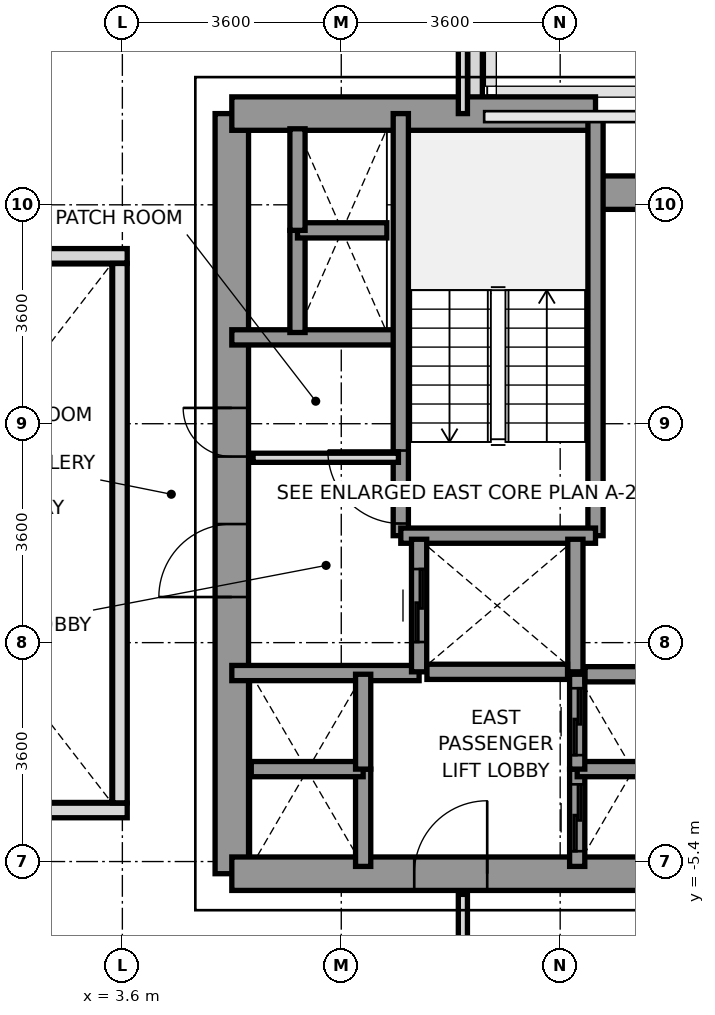
"""IFC4 building model, lengths in metres.
Left out: names, types, materials, properties, quantities, classifications, styles, units other than length and angle.
Written with IfcOpenShell. Run it as: python <this file> out.ifc"""

import sys

from ifc_helpers import new_model, si_unit, direction, frame, frame_2d, origin, place, context, subcontext, project, spatial, rectangle, extrude, source, transform, mapped, element, fill, save


model = new_model("IFC4")
c1 = context("Model", 3, precision=1e-05, world=origin(), true_north=direction((0.0, 1.0)))
c2 = subcontext(c1, "Body", "Model", "MODEL_VIEW")
j1 = project(units=[si_unit("LENGTHUNIT", "METRE"), si_unit("PLANEANGLEUNIT", "RADIAN")], contexts=[c1])
p1 = place(None, origin())
s1 = spatial("IfcSite", under=j1, at=p1, CompositionType="ELEMENT")
p2 = place(p1, origin())
s2 = spatial("IfcBuilding", under=s1, at=p2, CompositionType="ELEMENT")
p3 = place(p2, frame((0.0, 0.0, 71.4)))
s3 = spatial("IfcBuildingStorey", under=s2, at=p3, CompositionType="ELEMENT", Elevation=71.4)
p4 = place(p3, frame((9.4, 8.397, 0.0), z_axis=(0.0, 0.0, 1.0), x_axis=(0.0, -1.0, 0.0)))
e1 = element("IfcWall", 1, at=p4, inside=s3, PredefinedType="PARAPET", context=c2, shape_type="SweptSolid", body=[
    extrude(rectangle(XDim=1.444, YDim=0.24, at=frame_2d((0.722, 0.0))), origin(), (0.0, 0.0, 1.0), 1.15),
])
p5 = place(p3, frame((5.4, -5.6, 0.0), z_axis=(0.0, 0.0, 1.0), x_axis=(0.0, 1.0, 0.0)))
e2 = element("IfcWall", 2, at=p5, inside=s3, PredefinedType="SHEAR", context=c2, shape_type="SweptSolid", body=[
    extrude(rectangle(XDim=12.5, YDim=0.55, at=frame_2d((6.25, 0.0))), origin(), (0.0, 0.0, 1.0), 3.2),
])
p6 = place(p5, frame((4.55, 0.0, 0.0)))
e3 = element("IfcOpeningElement", 3, at=p6, cuts=e2, PredefinedType="OPENING", context=c2, shape_type="SweptSolid", body=[
    extrude(rectangle(XDim=1.2, YDim=2.2, at=frame_2d((0.6, 1.1))), frame((0.0, 0.285, 0.0), z_axis=(0.0, -1.0, 0.0), x_axis=(1.0, 0.0, 0.0)), (0.0, 0.0, 1.0), 0.57),
])
p7 = place(p5, frame((6.86, 0.0, 0.0)))
e4 = element("IfcOpeningElement", 4, at=p7, cuts=e2, PredefinedType="OPENING", context=c2, shape_type="SweptSolid", body=[
    extrude(rectangle(XDim=0.8, YDim=2.1, at=frame_2d((0.4, 1.05))), frame((0.0, 0.285, 0.0), z_axis=(0.0, -1.0, 0.0), x_axis=(1.0, 0.0, 0.0)), (0.0, 0.0, 1.0), 0.57),
])
p8 = place(p3, frame((5.4, 6.9, 0.0), z_axis=(0.0, 0.0, 1.0), x_axis=(1.0, 0.0, 0.0)))
e5 = element("IfcWall", 5, at=p8, inside=s3, PredefinedType="SHEAR", context=c2, shape_type="SweptSolid", body=[
    extrude(rectangle(XDim=5.981, YDim=0.55, at=frame_2d((2.991, 0.0))), origin(), (0.0, 0.0, 1.0), 3.2),
])
p9 = place(p3, frame((11.381, 5.6, 0.0), z_axis=(0.0, 0.0, 1.0), x_axis=(1.0, 0.0, 0.0)))
e6 = element("IfcWall", 6, at=p9, inside=s3, PredefinedType="SHEAR", context=c2, shape_type="SweptSolid", body=[
    extrude(rectangle(XDim=1.819, YDim=0.55, at=frame_2d((0.909, 0.0))), origin(), (0.0, 0.0, 1.0), 3.2),
])
p10 = place(p3, frame((5.4, -5.6, 0.0), z_axis=(0.0, 0.0, 1.0), x_axis=(1.0, 0.0, 0.0)))
e7 = element("IfcWall", 7, at=p10, inside=s3, PredefinedType="SHEAR", context=c2, shape_type="SweptSolid", body=[
    extrude(rectangle(XDim=7.8, YDim=0.55, at=frame_2d((3.9, 0.0))), origin(), (0.0, 0.0, 1.0), 3.2),
])
p11 = place(p10, frame((3.0, 0.0, 0.0)))
e8 = element("IfcOpeningElement", 8, at=p11, cuts=e7, PredefinedType="OPENING", context=c2, shape_type="SweptSolid", body=[
    extrude(rectangle(XDim=1.2, YDim=2.2, at=frame_2d((0.6, 1.1))), frame((0.0, 0.285, 0.0), z_axis=(0.0, -1.0, 0.0), x_axis=(1.0, 0.0, 0.0)), (0.0, 0.0, 1.0), 0.57),
])
p12 = place(p3, frame((5.4, 3.22, 0.0), z_axis=(0.0, 0.0, 1.0), x_axis=(1.0, 0.0, 0.0)))
e9 = element("IfcWall", 9, at=p12, inside=s3, PredefinedType="SOLIDWALL", context=c2, shape_type="SweptSolid", body=[
    extrude(rectangle(XDim=2.78, YDim=0.25, at=frame_2d((1.39, 0.0))), origin(), (0.0, 0.0, 1.0), 3.2),
])
p13 = place(p3, frame((5.4, -2.3, 0.0), z_axis=(0.0, 0.0, 1.0), x_axis=(1.0, 0.0, 0.0)))
e10 = element("IfcWall", 10, at=p13, inside=s3, PredefinedType="SOLIDWALL", context=c2, shape_type="SweptSolid", body=[
    extrude(rectangle(XDim=3.08, YDim=0.25, at=frame_2d((1.54, 0.0))), origin(), (0.0, 0.0, 1.0), 3.2),
])
p14 = place(p3, frame((8.179, -0.041, 0.0), z_axis=(0.0, 0.0, 1.0), x_axis=(0.0, 1.0, 0.0)))
e11 = element("IfcWall", 11, at=p14, inside=s3, PredefinedType="SOLIDWALL", context=c2, shape_type="SweptSolid", body=[
    extrude(rectangle(XDim=6.941, YDim=0.25, at=frame_2d((3.47, 0.0))), origin(), (0.0, 0.0, 1.0), 3.2),
])
p15 = place(p14, frame((0.2, 0.0, 0.0)))
e12 = element("IfcOpeningElement", 12, at=p15, cuts=e11, PredefinedType="OPENING", context=c2, shape_type="SweptSolid", body=[
    extrude(rectangle(XDim=1.2, YDim=2.2, at=frame_2d((0.6, 1.1))), frame((0.0, 0.135, 0.0), z_axis=(0.0, -1.0, 0.0), x_axis=(1.0, 0.0, 0.0)), (0.0, 0.0, 1.0), 0.27),
])
p16 = place(p3, frame((11.381, -0.041, 0.0), z_axis=(0.0, 0.0, 1.0), x_axis=(0.0, 1.0, 0.0)))
e13 = element("IfcWall", 13, at=p16, inside=s3, PredefinedType="SOLIDWALL", context=c2, shape_type="SweptSolid", body=[
    extrude(rectangle(XDim=6.941, YDim=0.25, at=frame_2d((3.47, 0.0))), origin(), (0.0, 0.0, 1.0), 3.2),
])
p17 = place(p3, frame((8.179, -0.041, 0.0), z_axis=(0.0, 0.0, 1.0), x_axis=(1.0, 0.0, 0.0)))
e14 = element("IfcWall", 14, at=p17, inside=s3, PredefinedType="SOLIDWALL", context=c2, shape_type="SweptSolid", body=[
    extrude(rectangle(XDim=3.202, YDim=0.25, at=frame_2d((1.601, 0.0))), origin(), (0.0, 0.0, 1.0), 3.2),
])
p18 = place(p3, frame((8.48, -2.28, 0.0), z_axis=(0.0, 0.0, 1.0), x_axis=(0.0, 1.0, 0.0)))
e15 = element("IfcWall", 15, at=p18, inside=s3, PredefinedType="SOLIDWALL", context=c2, shape_type="SweptSolid", body=[
    extrude(rectangle(XDim=2.18, YDim=0.25, at=frame_2d((1.09, 0.0))), origin(), (0.0, 0.0, 1.0), 3.2),
])
p19 = place(p18, frame((0.49, 0.0, 0.0)))
e16 = element("IfcOpeningElement", 16, at=p19, cuts=e15, PredefinedType="OPENING", context=c2, shape_type="SweptSolid", body=[
    extrude(rectangle(XDim=1.2, YDim=2.2, at=frame_2d((0.6, 1.1))), frame((0.0, 0.135, 0.0), z_axis=(0.0, -1.0, 0.0), x_axis=(1.0, 0.0, 0.0)), (0.0, 0.0, 1.0), 0.27),
])
p20 = place(p3, frame((11.05, -2.28, 0.0), z_axis=(0.0, 0.0, 1.0), x_axis=(0.0, 1.0, 0.0)))
e17 = element("IfcWall", 17, at=p20, inside=s3, PredefinedType="SOLIDWALL", context=c2, shape_type="SweptSolid", body=[
    extrude(rectangle(XDim=2.18, YDim=0.25, at=frame_2d((1.09, 0.0))), origin(), (0.0, 0.0, 1.0), 3.2),
])
p21 = place(p3, frame((8.609, -2.28, 0.0), z_axis=(0.0, 0.0, 1.0), x_axis=(1.0, 0.0, 0.0)))
e18 = element("IfcWall", 18, at=p21, inside=s3, PredefinedType="SOLIDWALL", context=c2, shape_type="SweptSolid", body=[
    extrude(rectangle(XDim=2.312, YDim=0.25, at=frame_2d((1.156, 0.0))), origin(), (0.0, 0.0, 1.0), 3.2),
])
p22 = place(p3, frame((11.08, -5.48, 0.0), z_axis=(0.0, 0.0, 1.0), x_axis=(0.0, 1.0, 0.0)))
e19 = element("IfcWall", 19, at=p22, inside=s3, PredefinedType="SOLIDWALL", context=c2, shape_type="SweptSolid", body=[
    extrude(rectangle(XDim=1.6, YDim=0.25, at=frame_2d((0.8, 0.0))), origin(), (0.0, 0.0, 1.0), 3.2),
])
p23 = place(p22, frame((0.25, 0.0, 0.0)))
e20 = element("IfcOpeningElement", 20, at=p23, cuts=e19, PredefinedType="OPENING", context=c2, shape_type="SweptSolid", body=[
    extrude(rectangle(XDim=1.1, YDim=2.2, at=frame_2d((0.55, 1.1))), frame((0.0, 0.135, 0.0), z_axis=(0.0, -1.0, 0.0), x_axis=(1.0, 0.0, 0.0)), (0.0, 0.0, 1.0), 0.27),
])
p24 = place(p3, frame((11.08, -3.88, 0.0), z_axis=(0.0, 0.0, 1.0), x_axis=(1.0, 0.0, 0.0)))
e21 = element("IfcWall", 21, at=p24, inside=s3, PredefinedType="SOLIDWALL", context=c2, shape_type="SweptSolid", body=[
    extrude(rectangle(XDim=1.84, YDim=0.25, at=frame_2d((0.92, 0.0))), origin(), (0.0, 0.0, 1.0), 3.2),
])
p25 = place(p3, frame((11.08, -3.88, 0.0), z_axis=(0.0, 0.0, 1.0), x_axis=(0.0, 1.0, 0.0)))
e22 = element("IfcWall", 22, at=p25, inside=s3, PredefinedType="SOLIDWALL", context=c2, shape_type="SweptSolid", body=[
    extrude(rectangle(XDim=1.56, YDim=0.25, at=frame_2d((0.78, 0.0))), origin(), (0.0, 0.0, 1.0), 3.2),
])
p26 = place(p25, frame((0.23, 0.0, 0.0)))
e23 = element("IfcOpeningElement", 23, at=p26, cuts=e22, PredefinedType="OPENING", context=c2, shape_type="SweptSolid", body=[
    extrude(rectangle(XDim=1.1, YDim=2.2, at=frame_2d((0.55, 1.1))), frame((0.0, 0.135, 0.0), z_axis=(0.0, -1.0, 0.0), x_axis=(1.0, 0.0, 0.0)), (0.0, 0.0, 1.0), 0.27),
])
p27 = place(p3, frame((11.209, -2.32, 0.0), z_axis=(0.0, 0.0, 1.0), x_axis=(1.0, 0.0, 0.0)))
e24 = element("IfcWall", 24, at=p27, inside=s3, PredefinedType="SOLIDWALL", context=c2, shape_type="SweptSolid", body=[
    extrude(rectangle(XDim=1.582, YDim=0.25, at=frame_2d((0.791, 0.0))), origin(), (0.0, 0.0, 1.0), 3.2),
])
p28 = place(p3, frame((7.56, -5.48, 0.0), z_axis=(0.0, 0.0, 1.0), x_axis=(0.0, 1.0, 0.0)))
e25 = element("IfcWall", 25, at=p28, inside=s3, PredefinedType="SOLIDWALL", context=c2, shape_type="SweptSolid", body=[
    extrude(rectangle(XDim=1.6, YDim=0.25, at=frame_2d((0.8, 0.0))), origin(), (0.0, 0.0, 1.0), 3.2),
])
p29 = place(p3, frame((5.72, -3.88, 0.0), z_axis=(0.0, 0.0, 1.0), x_axis=(1.0, 0.0, 0.0)))
e26 = element("IfcWall", 26, at=p29, inside=s3, PredefinedType="SOLIDWALL", context=c2, shape_type="SweptSolid", body=[
    extrude(rectangle(XDim=1.84, YDim=0.25, at=frame_2d((0.92, 0.0))), origin(), (0.0, 0.0, 1.0), 3.2),
])
p30 = place(p3, frame((7.56, -3.88, 0.0), z_axis=(0.0, 0.0, 1.0), x_axis=(0.0, 1.0, 0.0)))
e27 = element("IfcWall", 27, at=p30, inside=s3, PredefinedType="SOLIDWALL", context=c2, shape_type="SweptSolid", body=[
    extrude(rectangle(XDim=1.56, YDim=0.25, at=frame_2d((0.78, 0.0))), origin(), (0.0, 0.0, 1.0), 3.2),
])
p31 = place(p3, frame((6.48, 3.3, 0.0), z_axis=(0.0, 0.0, 1.0), x_axis=(0.0, 1.0, 0.0)))
e28 = element("IfcWall", 28, at=p31, inside=s3, PredefinedType="SOLIDWALL", context=c2, shape_type="SweptSolid", body=[
    extrude(rectangle(XDim=1.68, YDim=0.25, at=frame_2d((0.84, 0.0))), origin(), (0.0, 0.0, 1.0), 3.2),
])
p32 = place(p3, frame((6.48, 4.98, 0.0), z_axis=(0.0, 0.0, 1.0), x_axis=(1.0, 0.0, 0.0)))
e29 = element("IfcWall", 29, at=p32, inside=s3, PredefinedType="SOLIDWALL", context=c2, shape_type="SweptSolid", body=[
    extrude(rectangle(XDim=1.47, YDim=0.25, at=frame_2d((0.735, 0.0))), origin(), (0.0, 0.0, 1.0), 3.2),
])
p33 = place(p3, frame((6.48, 4.98, 0.0), z_axis=(0.0, 0.0, 1.0), x_axis=(0.0, 1.0, 0.0)))
e30 = element("IfcWall", 30, at=p33, inside=s3, PredefinedType="SOLIDWALL", context=c2, shape_type="SweptSolid", body=[
    extrude(rectangle(XDim=1.67, YDim=0.25, at=frame_2d((0.835, 0.0))), origin(), (0.0, 0.0, 1.0), 3.2),
])
p34 = place(p3, frame((5.75, 1.24, 0.0), z_axis=(0.0, 0.0, 1.0), x_axis=(1.0, 0.0, 0.0)))
e31 = element("IfcWall", 31, at=p34, inside=s3, PredefinedType="PARTITIONING", context=c2, shape_type="SweptSolid", body=[
    extrude(rectangle(XDim=2.39, YDim=0.15, at=frame_2d((1.195, 0.0))), origin(), (0.0, 0.0, 1.0), 2.3),
])
p35 = place(p3, frame((9.2, 6.9, 0.0), z_axis=(0.0, 0.0, 1.0), x_axis=(0.0, 1.0, 0.0)))
e32 = element("IfcWall", 32, at=p35, inside=s3, PredefinedType="PARTITIONING", context=c2, shape_type="SweptSolid", body=[
    extrude(rectangle(XDim=8.78, YDim=0.15, at=frame_2d((4.39, 0.0))), origin(), (0.0, 0.0, 1.0), 2.65),
])
p36 = place(p3, frame((9.2, -15.68, 0.0), z_axis=(0.0, 0.0, 1.0), x_axis=(0.0, 1.0, 0.0)))
e33 = element("IfcWall", 33, at=p36, inside=s3, PredefinedType="PARTITIONING", context=c2, shape_type="SweptSolid", body=[
    extrude(rectangle(XDim=9.74, YDim=0.15, at=frame_2d((4.87, 0.0))), origin(), (0.0, 0.0, 1.0), 2.65),
])
for number, where, z_axis, x_axis in (
    (34, (-3.68, -4.56, 0.0), (0.0, 0.0, 1.0), (1.0, 0.0, 0.0)),
    (35, (-3.68, 4.56, 0.0), (0.0, 0.0, 1.0), (1.0, 0.0, 0.0)),
):
    element("IfcWall", number, at=place(p3, frame(where, z_axis=z_axis, x_axis=x_axis)), inside=s3, PredefinedType="PARAPET", context=c2, shape_type="SweptSolid", body=[
        extrude(rectangle(XDim=7.36, YDim=0.24, at=frame_2d((3.68, 0.0))), origin(), (0.0, 0.0, 1.0), 1.15),
    ])
p37 = place(p3, frame((3.56, -4.435, 0.0), z_axis=(0.0, 0.0, 1.0), x_axis=(0.0, 1.0, 0.0)))
e36 = element("IfcWall", 36, at=p37, inside=s3, PredefinedType="PARAPET", context=c2, shape_type="SweptSolid", body=[
    extrude(rectangle(XDim=8.87, YDim=0.24, at=frame_2d((4.435, 0.0))), origin(), (0.0, 0.0, 1.0), 1.15),
])
m1 = source(origin(), c2, "Body", "SweptSolid", [
    extrude(rectangle(XDim=1.2, YDim=2.2, at=frame_2d((0.6, 1.1))), frame((0.0, 0.025, 0.0), z_axis=(0.0, -1.0, 0.0), x_axis=(1.0, 0.0, 0.0)), (0.0, 0.0, 1.0), 0.05),
])
p38 = place(p15, origin())
e37 = element("IfcDoor", 37, at=p38, inside=s3, OperationType="SINGLE_SWING_RIGHT", PredefinedType="DOOR", context=c2, shape_type="MappedRepresentation", body=[
    mapped(m1, transform((0.0, 0.0, 0.0), x_axis=(1.0, 0.0, 0.0), y_axis=(0.0, 1.0, 0.0), z_axis=(0.0, 0.0, 1.0), scale=1.0)),
])
fill(e12, e37)
p39 = place(p6, origin())
e38 = element("IfcDoor", 38, at=p39, inside=s3, OperationType="SINGLE_SWING_LEFT", PredefinedType="DOOR", context=c2, shape_type="MappedRepresentation", body=[
    mapped(m1, transform((0.0, 0.0, 0.0), x_axis=(1.0, 0.0, 0.0), y_axis=(0.0, 1.0, 0.0), z_axis=(0.0, 0.0, 1.0), scale=1.0)),
])
fill(e3, e38)
p40 = place(p11, origin())
e39 = element("IfcDoor", 39, at=p40, inside=s3, OperationType="SINGLE_SWING_RIGHT", PredefinedType="DOOR", context=c2, shape_type="MappedRepresentation", body=[
    mapped(m1, transform((0.0, 0.0, 0.0), x_axis=(1.0, 0.0, 0.0), y_axis=(0.0, 1.0, 0.0), z_axis=(0.0, 0.0, 1.0), scale=1.0)),
])
fill(e8, e39)
m2 = source(origin(), c2, "Body", "SweptSolid", [
    extrude(rectangle(XDim=0.8, YDim=2.1, at=frame_2d((0.4, 1.05))), frame((0.0, 0.025, 0.0), z_axis=(0.0, -1.0, 0.0), x_axis=(1.0, 0.0, 0.0)), (0.0, 0.0, 1.0), 0.05),
])
p41 = place(p7, origin())
e40 = element("IfcDoor", 40, at=p41, inside=s3, OperationType="SINGLE_SWING_RIGHT", PredefinedType="DOOR", context=c2, shape_type="MappedRepresentation", body=[
    mapped(m2, transform((0.0, 0.0, 0.0), x_axis=(1.0, 0.0, 0.0), y_axis=(0.0, 1.0, 0.0), z_axis=(0.0, 0.0, 1.0), scale=1.0)),
])
fill(e4, e40)
p42 = place(p19, origin())
e41 = element("IfcDoor", 41, at=p42, inside=s3, OperationType="SLIDING_TO_RIGHT", PredefinedType="DOOR", context=c2, shape_type="MappedRepresentation", body=[
    mapped(m1, transform((0.0, 0.0, 0.0), x_axis=(1.0, 0.0, 0.0), y_axis=(0.0, 1.0, 0.0), z_axis=(0.0, 0.0, 1.0), scale=1.0)),
])
fill(e16, e41)
m3 = source(origin(), c2, "Body", "SweptSolid", [
    extrude(rectangle(XDim=1.1, YDim=2.2, at=frame_2d((0.55, 1.1))), frame((0.0, 0.025, 0.0), z_axis=(0.0, -1.0, 0.0), x_axis=(1.0, 0.0, 0.0)), (0.0, 0.0, 1.0), 0.05),
])
p43 = place(p23, origin())
e42 = element("IfcDoor", 42, at=p43, inside=s3, OperationType="SLIDING_TO_LEFT", PredefinedType="DOOR", context=c2, shape_type="MappedRepresentation", body=[
    mapped(m3, transform((0.0, 0.0, 0.0), x_axis=(1.0, 0.0, 0.0), y_axis=(0.0, 1.0, 0.0), z_axis=(0.0, 0.0, 1.0), scale=1.0)),
])
fill(e20, e42)
p44 = place(p26, origin())
e43 = element("IfcDoor", 43, at=p44, inside=s3, OperationType="SLIDING_TO_LEFT", PredefinedType="DOOR", context=c2, shape_type="MappedRepresentation", body=[
    mapped(m3, transform((0.0, 0.0, 0.0), x_axis=(1.0, 0.0, 0.0), y_axis=(0.0, 1.0, 0.0), z_axis=(0.0, 0.0, 1.0), scale=1.0)),
])
fill(e23, e43)
save(model, sys.argv[1])
